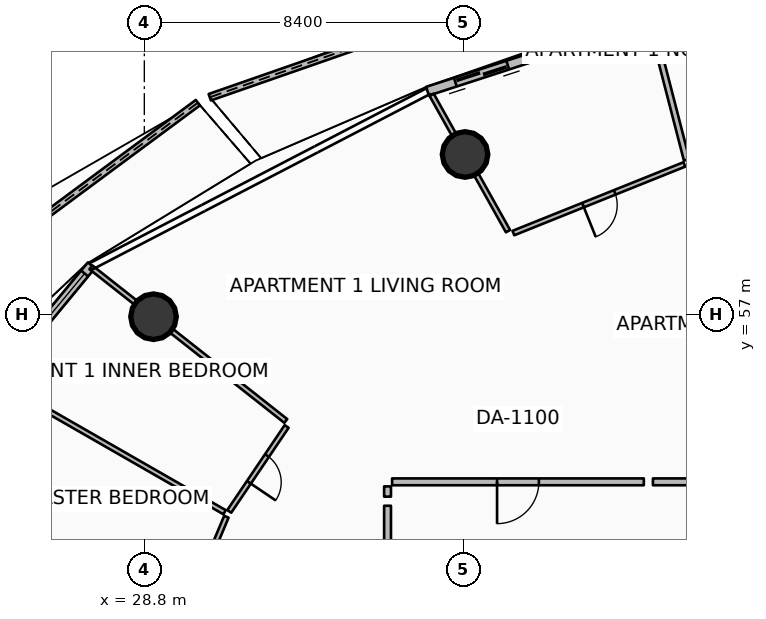
"""IFC4 building model, lengths in metres.
Left out: names, types, materials, properties, quantities, classifications, styles, units other than length and angle.
Written with IfcOpenShell. Run it as: python <this file> out.ifc"""

import sys

from ifc_helpers import new_model, si_unit, direction, frame, frame_2d, origin, origin_2d, place, context, subcontext, project, spatial, polyline, rectangle, circle, outline, extrude, element, fill, save


model = new_model("IFC4")
c1 = context("Model", 3, precision=1e-05, world=origin(), true_north=direction((0.0, 1.0)))
c2 = subcontext(c1, "Body", "Model", "MODEL_VIEW")
j1 = project(units=[si_unit("LENGTHUNIT", "METRE"), si_unit("PLANEANGLEUNIT", "RADIAN")], contexts=[c1])
p1 = place(None, origin())
s1 = spatial("IfcSite", under=j1, at=p1, CompositionType="ELEMENT")
p2 = place(p1, origin())
s2 = spatial("IfcBuilding", under=s1, at=p2, CompositionType="ELEMENT")
p3 = place(p2, frame((0.0, 0.0, 105.15)))
s3 = spatial("IfcBuildingStorey", under=s2, at=p3, CompositionType="ELEMENT", Elevation=105.15)
for number, where, z_axis, x_axis in (
    (1, (37.24, 61.214, 0.0), (0.0, 0.0, 1.0), (1.0, 0.0, 0.0)),
    (2, (29.042, 56.945, 0.0), (0.0, 0.0, 1.0), (1.0, 0.0, 0.0)),
):
    element("IfcColumn", number, at=place(p3, frame(where, z_axis=z_axis, x_axis=x_axis)), inside=s3, PredefinedType="COLUMN", context=c2, shape_type="SweptSolid", body=[
        extrude(circle(Radius=0.6, at=origin_2d()), origin(), (0.0, 0.0, 1.0), 3.5),
    ])
p4 = place(p3, frame((40.062, 66.043, 0.0), z_axis=(0.0, 0.0, 1.0), x_axis=(-0.944336605893, -0.328980812161, 0.0)))
e3 = element("IfcWall", 3, at=p4, inside=s3, PredefinedType="PARAPET", context=c2, shape_type="SweptSolid", body=[
    extrude(outline(polyline([(0.0, 0.0), (10.102, 0.0), (10.102, 1.483), (5.051, 1.284), (0.0, 1.148), (0.0, 0.0)])), frame((0.0, 0.09, 0.0), z_axis=(0.0, -1.0, 0.0), x_axis=(1.0, 0.0, 0.0)), (0.0, 0.0, 1.0), 0.18),
])
p5 = place(p3, frame((30.208, 62.576, 0.0), z_axis=(0.0, 0.0, 1.0), x_axis=(-0.803659411402, -0.59508953147, 0.0)))
e4 = element("IfcWall", 4, at=p5, inside=s3, PredefinedType="PARAPET", context=c2, shape_type="SweptSolid", body=[
    extrude(outline(polyline([(0.0, 0.0), (11.338, 0.0), (11.338, 1.832), (5.669, 1.696), (0.0, 1.497), (0.0, 0.0)])), frame((0.0, 0.09, 0.0), z_axis=(0.0, -1.0, 0.0), x_axis=(1.0, 0.0, 0.0)), (0.0, 0.0, 1.0), 0.18),
])
p6 = place(p3, frame((45.233, 65.797, 0.0), z_axis=(0.0, 0.0, 1.0), x_axis=(-0.951052494852, -0.30902937083, 0.0)))
e5 = element("IfcWall", 5, at=p6, inside=s3, PredefinedType="SOLIDWALL", context=c2, shape_type="SweptSolid", body=[
    extrude(rectangle(XDim=9.444, YDim=0.24, at=frame_2d((4.722, 0.0))), origin(), (0.0, 0.0, 1.0), 2.45),
])
p7 = place(p6, frame((7.224, 0.0, 0.0)))
e6 = element("IfcOpeningElement", 6, at=p7, cuts=e5, PredefinedType="OPENING", context=c2, shape_type="SweptSolid", body=[
    extrude(rectangle(XDim=1.45, YDim=2.15, at=frame_2d((0.725, 1.075))), frame((0.0, 0.13, 0.0), z_axis=(0.0, -1.0, 0.0), x_axis=(1.0, 0.0, 0.0)), (0.0, 0.0, 1.0), 0.26),
])
p8 = place(p6, frame((0.28, 0.0, 0.65)))
e7 = element("IfcOpeningElement", 7, at=p8, cuts=e5, PredefinedType="OPENING", context=c2, shape_type="SweptSolid", body=[
    extrude(rectangle(XDim=1.6, YDim=1.5, at=frame_2d((0.8, 0.75))), frame((0.0, 0.13, 0.0), z_axis=(0.0, -1.0, 0.0), x_axis=(1.0, 0.0, 0.0)), (0.0, 0.0, 1.0), 0.26),
])
p9 = place(p3, frame((27.407, 58.298, 0.0), z_axis=(0.0, 0.0, 1.0), x_axis=(-0.636704975, -0.771107498868, 0.0)))
e8 = element("IfcWall", 8, at=p9, inside=s3, PredefinedType="SOLIDWALL", context=c2, shape_type="SweptSolid", body=[
    extrude(rectangle(XDim=11.084, YDim=0.24, at=frame_2d((5.542, 0.0))), origin(), (0.0, 0.0, 1.0), 2.45),
])
p10 = place(p9, frame((8.864, 0.0, 0.0)))
e9 = element("IfcOpeningElement", 9, at=p10, cuts=e8, PredefinedType="OPENING", context=c2, shape_type="SweptSolid", body=[
    extrude(rectangle(XDim=1.45, YDim=2.15, at=frame_2d((0.725, 1.075))), frame((0.0, 0.13, 0.0), z_axis=(0.0, -1.0, 0.0), x_axis=(1.0, 0.0, 0.0)), (0.0, 0.0, 1.0), 0.26),
])
p11 = place(p9, frame((0.28, 0.0, 0.65)))
e10 = element("IfcOpeningElement", 10, at=p11, cuts=e8, PredefinedType="OPENING", context=c2, shape_type="SweptSolid", body=[
    extrude(rectangle(XDim=1.6, YDim=1.5, at=frame_2d((0.8, 0.75))), frame((0.0, 0.13, 0.0), z_axis=(0.0, -1.0, 0.0), x_axis=(1.0, 0.0, 0.0)), (0.0, 0.0, 1.0), 0.26),
])
p12 = place(p3, frame((41.944, 52.6, 0.0), z_axis=(0.0, 0.0, 1.0), x_axis=(-1.0, 0.0, 0.0)))
e11 = element("IfcWall", 11, at=p12, inside=s3, PredefinedType="PARTITIONING", context=c2, shape_type="SweptSolid", body=[
    extrude(rectangle(XDim=6.624, YDim=0.18, at=frame_2d((3.312, 0.0))), origin(), (0.0, 0.0, 1.0), 2.94),
])
p13 = place(p12, frame((2.762, 0.0, 0.0)))
e12 = element("IfcOpeningElement", 12, at=p13, cuts=e11, PredefinedType="OPENING", context=c2, shape_type="SweptSolid", body=[
    extrude(rectangle(XDim=1.1, YDim=2.1, at=frame_2d((0.55, 1.05))), frame((0.0, 0.1, 0.0), z_axis=(0.0, -1.0, 0.0), x_axis=(1.0, 0.0, 0.0)), (0.0, 0.0, 1.0), 0.2),
])
p14 = place(p3, frame((35.2, 52.48, 0.0), z_axis=(0.0, 0.0, 1.0), x_axis=(0.0, -1.0, 0.0)))
e13 = element("IfcWall", 13, at=p14, inside=s3, PredefinedType="PARTITIONING", context=c2, shape_type="SweptSolid", body=[
    extrude(rectangle(XDim=0.269, YDim=0.18, at=frame_2d((0.135, 0.0))), origin(), (0.0, 0.0, 1.0), 2.94),
])
p15 = place(p3, frame((46.625, 52.6, 0.0), z_axis=(0.0, 0.0, 1.0), x_axis=(-1.0, 0.0, 0.0)))
e14 = element("IfcWall", 14, at=p15, inside=s3, PredefinedType="PARTITIONING", context=c2, shape_type="SweptSolid", body=[
    extrude(rectangle(XDim=4.442, YDim=0.18, at=frame_2d((2.221, 0.0))), origin(), (0.0, 0.0, 1.0), 2.94),
])
p16 = place(p3, frame((38.37, 59.196, 0.0), z_axis=(0.0, 0.0, 1.0), x_axis=(-0.488603368932, 0.87250601595, 0.0)))
e15 = element("IfcWall", 15, at=p16, inside=s3, PredefinedType="PARTITIONING", context=c2, shape_type="SweptSolid", body=[
    extrude(rectangle(XDim=4.113, YDim=0.125, at=frame_2d((2.057, 0.0))), origin(), (0.0, 0.0, 1.0), 2.94),
])
p17 = place(p3, frame((43.071, 61.073, 0.0), z_axis=(0.0, 0.0, 1.0), x_axis=(-0.250228515302, 0.968186805389, 0.0)))
e16 = element("IfcWall", 16, at=p17, inside=s3, PredefinedType="PARTITIONING", context=c2, shape_type="SweptSolid", body=[
    extrude(rectangle(XDim=3.708, YDim=0.15, at=frame_2d((1.854, 0.0))), origin(), (0.0, 0.0, 1.0), 2.94),
])
p18 = place(p3, frame((43.01, 60.952, 0.0), z_axis=(0.0, 0.0, 1.0), x_axis=(-0.9280140097, -0.372545296307, 0.0)))
e17 = element("IfcWall", 17, at=p18, inside=s3, PredefinedType="PARTITIONING", context=c2, shape_type="SweptSolid", body=[
    extrude(rectangle(XDim=4.847, YDim=0.125, at=frame_2d((2.424, 0.0))), origin(), (0.0, 0.0, 1.0), 2.94),
])
p19 = place(p18, frame((1.974, 0.0, 0.0)))
e18 = element("IfcOpeningElement", 18, at=p19, cuts=e17, PredefinedType="OPENING", context=c2, shape_type="SweptSolid", body=[
    extrude(rectangle(XDim=0.9, YDim=2.08, at=frame_2d((0.45, 1.04))), frame((0.0, 0.073, 0.0), z_axis=(0.0, -1.0, 0.0), x_axis=(1.0, 0.0, 0.0)), (0.0, 0.0, 1.0), 0.145),
])
p20 = place(p3, frame((35.2, 51.971, 0.0), z_axis=(0.0, 0.0, 1.0), x_axis=(0.0, -1.0, 0.0)))
e19 = element("IfcWall", 19, at=p20, inside=s3, PredefinedType="PARTITIONING", context=c2, shape_type="SweptSolid", body=[
    extrude(rectangle(XDim=6.241, YDim=0.18, at=frame_2d((3.12, 0.0))), origin(), (0.0, 0.0, 1.0), 2.94),
])
p21 = place(p3, frame((32.522, 54.202, 0.0), z_axis=(0.0, 0.0, 1.0), x_axis=(-0.785296086335, 0.619120389574, 0.0)))
e20 = element("IfcWall", 20, at=p21, inside=s3, PredefinedType="PARTITIONING", context=c2, shape_type="SweptSolid", body=[
    extrude(rectangle(XDim=6.529, YDim=0.125, at=frame_2d((3.265, 0.0))), origin(), (0.0, 0.0, 1.0), 2.94),
])
p22 = place(p3, frame((30.912, 51.8, 0.0), z_axis=(0.0, 0.0, 1.0), x_axis=(-0.867452705788, 0.497519651091, 0.0)))
e21 = element("IfcWall", 21, at=p22, inside=s3, PredefinedType="PARTITIONING", context=c2, shape_type="SweptSolid", body=[
    extrude(rectangle(XDim=6.814, YDim=0.125, at=frame_2d((3.407, 0.0))), origin(), (0.0, 0.0, 1.0), 2.94),
])
p23 = place(p3, frame((32.545, 54.057, 0.0), z_axis=(0.0, 0.0, 1.0), x_axis=(-0.559849013212, -0.828594642998, 0.0)))
e22 = element("IfcWall", 22, at=p23, inside=s3, PredefinedType="PARTITIONING", context=c2, shape_type="SweptSolid", body=[
    extrude(rectangle(XDim=2.697, YDim=0.125, at=frame_2d((1.349, 0.0))), origin(), (0.0, 0.0, 1.0), 2.94),
])
p24 = place(p23, frame((0.924, 0.0, 0.0)))
e23 = element("IfcOpeningElement", 23, at=p24, cuts=e22, PredefinedType="OPENING", context=c2, shape_type="SweptSolid", body=[
    extrude(rectangle(XDim=0.85, YDim=2.06, at=frame_2d((0.425, 1.03))), frame((0.0, 0.073, 0.0), z_axis=(0.0, -1.0, 0.0), x_axis=(1.0, 0.0, 0.0)), (0.0, 0.0, 1.0), 0.145),
])
p25 = place(p3, frame((30.959, 51.682, 0.0), z_axis=(0.0, 0.0, 1.0), x_axis=(-0.387377754923, -0.921921078505, 0.0)))
e24 = element("IfcWall", 24, at=p25, inside=s3, PredefinedType="PARTITIONING", context=c2, shape_type="SweptSolid", body=[
    extrude(rectangle(XDim=4.628, YDim=0.125, at=frame_2d((2.314, 0.0))), origin(), (0.0, 0.0, 1.0), 2.94),
])
p26 = place(p25, frame((1.864, 0.0, 0.0)))
e25 = element("IfcOpeningElement", 25, at=p26, cuts=e24, PredefinedType="OPENING", context=c2, shape_type="SweptSolid", body=[
    extrude(rectangle(XDim=0.9, YDim=2.08, at=frame_2d((0.45, 1.04))), frame((0.0, 0.073, 0.0), z_axis=(0.0, -1.0, 0.0), x_axis=(1.0, 0.0, 0.0)), (0.0, 0.0, 1.0), 0.145),
])
p27 = place(p7, origin())
e26 = element("IfcDoor", 26, at=p27, inside=s3, OperationType="DOUBLE_DOOR_SLIDING", PredefinedType="DOOR", context=c2, shape_type="SweptSolid", body=[
    extrude(rectangle(XDim=1.45, YDim=2.15, at=frame_2d((0.725, 1.075))), frame((0.0, 0.025, 0.0), z_axis=(0.0, -1.0, 0.0), x_axis=(1.0, 0.0, 0.0)), (0.0, 0.0, 1.0), 0.05),
])
fill(e6, e26)
p28 = place(p11, origin())
e27 = element("IfcWindow", 27, at=p28, inside=s3, PartitioningType="SINGLE_PANEL", PredefinedType="WINDOW", context=c2, shape_type="SweptSolid", body=[
    extrude(rectangle(XDim=1.6, YDim=1.5, at=frame_2d((0.8, 0.75))), frame((0.0, 0.03, 0.0), z_axis=(0.0, -1.0, 0.0), x_axis=(1.0, 0.0, 0.0)), (0.0, 0.0, 1.0), 0.06),
])
fill(e10, e27)
p29 = place(p13, origin())
e28 = element("IfcDoor", 28, at=p29, inside=s3, OperationType="SINGLE_SWING_RIGHT", PredefinedType="DOOR", context=c2, shape_type="SweptSolid", body=[
    extrude(rectangle(XDim=1.1, YDim=2.1, at=frame_2d((0.55, 1.05))), frame((0.0, 0.025, 0.0), z_axis=(0.0, -1.0, 0.0), x_axis=(1.0, 0.0, 0.0)), (0.0, 0.0, 1.0), 0.05),
])
fill(e12, e28)
p30 = place(p19, origin())
e29 = element("IfcDoor", 29, at=p30, inside=s3, OperationType="SINGLE_SWING_RIGHT", PredefinedType="DOOR", context=c2, shape_type="SweptSolid", body=[
    extrude(rectangle(XDim=0.9, YDim=2.08, at=frame_2d((0.45, 1.04))), frame((0.0, 0.025, 0.0), z_axis=(0.0, -1.0, 0.0), x_axis=(1.0, 0.0, 0.0)), (0.0, 0.0, 1.0), 0.05),
])
fill(e18, e29)
p31 = place(p24, origin())
e30 = element("IfcDoor", 30, at=p31, inside=s3, OperationType="SINGLE_SWING_RIGHT", PredefinedType="DOOR", context=c2, shape_type="SweptSolid", body=[
    extrude(rectangle(XDim=0.85, YDim=2.06, at=frame_2d((0.425, 1.03))), frame((0.0, 0.025, 0.0), z_axis=(0.0, -1.0, 0.0), x_axis=(1.0, 0.0, 0.0)), (0.0, 0.0, 1.0), 0.05),
])
fill(e23, e30)
save(model, sys.argv[1])
